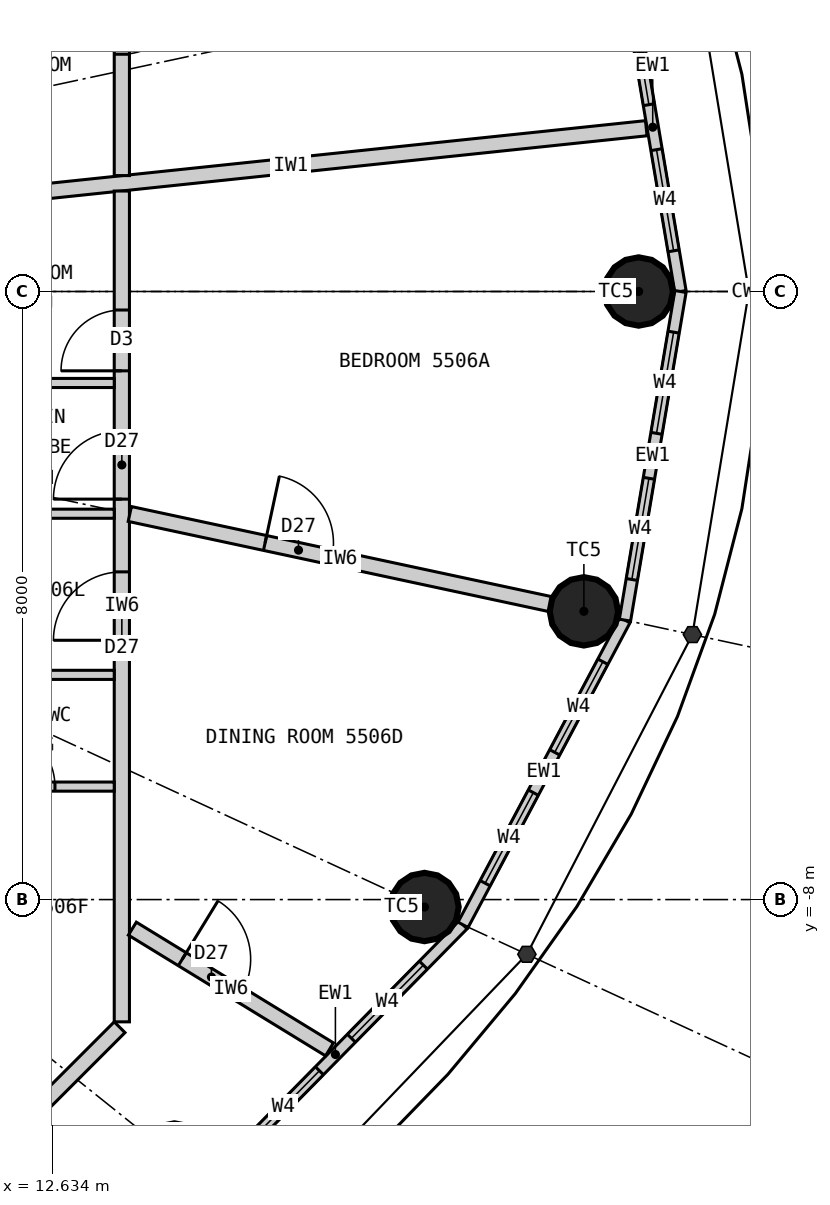
"""IFC4 building model, lengths in metres.
Left out: names, types, materials, properties, quantities, classifications, styles, units other than length and angle.
Written with IfcOpenShell. Run it as: python <this file> out.ifc"""

import sys

from ifc_helpers import new_model, si_unit, direction, frame, frame_2d, origin, origin_2d, place, context, subcontext, project, spatial, rectangle, circle, extrude, element, fill, save


model = new_model("IFC4")
c1 = context("Model", 3, precision=1e-05, world=origin(), true_north=direction((0.0, 1.0)))
c2 = subcontext(c1, "Body", "Model", "MODEL_VIEW")
j1 = project(units=[si_unit("LENGTHUNIT", "METRE"), si_unit("PLANEANGLEUNIT", "RADIAN")], contexts=[c1])
p1 = place(None, origin())
s1 = spatial("IfcSite", under=j1, at=p1, CompositionType="ELEMENT")
p2 = place(p1, origin())
s2 = spatial("IfcBuilding", under=s1, at=p2, CompositionType="ELEMENT")
p3 = place(p2, frame((0.0, 0.0, 206.1)))
s3 = spatial("IfcBuildingStorey", under=s2, at=p3, CompositionType="ELEMENT", Elevation=206.1)
for number, where, z_axis, x_axis in (
    (1, (20.35, 0.0, 0.0), (0.0, 0.0, 1.0), (1.0, 0.0, 0.0)),
    (2, (14.241, -11.393, 0.0), (0.0, 0.0, 1.0), (1.0, 0.0, 0.0)),
    (3, (17.532, -8.098, 0.0), (0.0, 0.0, 1.0), (1.0, 0.0, 0.0)),
    (4, (19.629, -4.208, 0.0), (0.0, 0.0, 1.0), (1.0, 0.0, 0.0)),
):
    element("IfcColumn", number, at=place(p3, frame(where, z_axis=z_axis, x_axis=x_axis)), inside=s3, PredefinedType="COLUMN", context=c2, shape_type="SweptSolid", body=[
        extrude(circle(Radius=0.45, at=origin_2d()), origin(), (0.0, 0.0, 1.0), 3.3),
    ])
p4 = place(p3, frame((20.9, 0.0, 0.0), z_axis=(0.0, 0.0, 1.0), x_axis=(-0.166538513568, 0.986034950445, 0.0)))
e5 = element("IfcWall", 5, at=p4, inside=s3, PredefinedType="ELEMENTEDWALL", context=c2, shape_type="SweptSolid", body=[
    extrude(rectangle(XDim=4.385, YDim=0.15, at=frame_2d((2.192, 0.0))), origin(), (0.0, 0.0, 1.0), 3.12),
])
p5 = place(p4, frame((0.542, 0.0, 0.9)))
e6 = element("IfcOpeningElement", 6, at=p5, cuts=e5, PredefinedType="OPENING", context=c2, shape_type="SweptSolid", body=[
    extrude(rectangle(XDim=1.35, YDim=1.9, at=frame_2d((0.675, 0.95))), frame((0.0, 0.085, 0.0), z_axis=(0.0, -1.0, 0.0), x_axis=(1.0, 0.0, 0.0)), (0.0, 0.0, 1.0), 0.17),
])
p6 = place(p4, frame((2.492, 0.0, 0.9)))
e7 = element("IfcOpeningElement", 7, at=p6, cuts=e5, PredefinedType="OPENING", context=c2, shape_type="SweptSolid", body=[
    extrude(rectangle(XDim=1.35, YDim=1.9, at=frame_2d((0.675, 0.95))), frame((0.0, 0.085, 0.0), z_axis=(0.0, -1.0, 0.0), x_axis=(1.0, 0.0, 0.0)), (0.0, 0.0, 1.0), 0.17),
])
p7 = place(p3, frame((14.68, -11.744, 0.0), z_axis=(0.0, 0.0, 1.0), x_axis=(0.701527379618, 0.712642501993, 0.0)))
e8 = element("IfcWall", 8, at=p7, inside=s3, PredefinedType="ELEMENTEDWALL", context=c2, shape_type="SweptSolid", body=[
    extrude(rectangle(XDim=4.788, YDim=0.15, at=frame_2d((2.394, 0.0))), origin(), (0.0, 0.0, 1.0), 3.12),
])
p8 = place(p7, frame((0.744, 0.0, 0.9)))
e9 = element("IfcOpeningElement", 9, at=p8, cuts=e8, PredefinedType="OPENING", context=c2, shape_type="SweptSolid", body=[
    extrude(rectangle(XDim=1.35, YDim=1.9, at=frame_2d((0.675, 0.95))), frame((0.0, 0.085, 0.0), z_axis=(0.0, -1.0, 0.0), x_axis=(1.0, 0.0, 0.0)), (0.0, 0.0, 1.0), 0.17),
])
p9 = place(p7, frame((2.694, 0.0, 0.9)))
e10 = element("IfcOpeningElement", 10, at=p9, cuts=e8, PredefinedType="OPENING", context=c2, shape_type="SweptSolid", body=[
    extrude(rectangle(XDim=1.35, YDim=1.9, at=frame_2d((0.675, 0.95))), frame((0.0, 0.085, 0.0), z_axis=(0.0, -1.0, 0.0), x_axis=(1.0, 0.0, 0.0)), (0.0, 0.0, 1.0), 0.17),
])
p10 = place(p3, frame((18.04, -8.332, 0.0), z_axis=(0.0, 0.0, 1.0), x_axis=(0.469256152955, 0.883062094597, 0.0)))
e11 = element("IfcWall", 11, at=p10, inside=s3, PredefinedType="ELEMENTEDWALL", context=c2, shape_type="SweptSolid", body=[
    extrude(rectangle(XDim=4.539, YDim=0.15, at=frame_2d((2.27, 0.0))), origin(), (0.0, 0.0, 1.0), 3.12),
])
p11 = place(p10, frame((0.62, 0.0, 0.9)))
e12 = element("IfcOpeningElement", 12, at=p11, cuts=e11, PredefinedType="OPENING", context=c2, shape_type="SweptSolid", body=[
    extrude(rectangle(XDim=1.35, YDim=1.9, at=frame_2d((0.675, 0.95))), frame((0.0, 0.085, 0.0), z_axis=(0.0, -1.0, 0.0), x_axis=(1.0, 0.0, 0.0)), (0.0, 0.0, 1.0), 0.17),
])
p12 = place(p10, frame((2.57, 0.0, 0.9)))
e13 = element("IfcOpeningElement", 13, at=p12, cuts=e11, PredefinedType="OPENING", context=c2, shape_type="SweptSolid", body=[
    extrude(rectangle(XDim=1.35, YDim=1.9, at=frame_2d((0.675, 0.95))), frame((0.0, 0.085, 0.0), z_axis=(0.0, -1.0, 0.0), x_axis=(1.0, 0.0, 0.0)), (0.0, 0.0, 1.0), 0.17),
])
p13 = place(p3, frame((20.17, -4.323, 0.0), z_axis=(0.0, 0.0, 1.0), x_axis=(0.166538513568, 0.986034950445, 0.0)))
e14 = element("IfcWall", 14, at=p13, inside=s3, PredefinedType="ELEMENTEDWALL", context=c2, shape_type="SweptSolid", body=[
    extrude(rectangle(XDim=4.385, YDim=0.15, at=frame_2d((2.192, 0.0))), origin(), (0.0, 0.0, 1.0), 3.12),
])
p14 = place(p13, frame((0.542, 0.0, 0.9)))
e15 = element("IfcOpeningElement", 15, at=p14, cuts=e14, PredefinedType="OPENING", context=c2, shape_type="SweptSolid", body=[
    extrude(rectangle(XDim=1.35, YDim=1.9, at=frame_2d((0.675, 0.95))), frame((0.0, 0.085, 0.0), z_axis=(0.0, -1.0, 0.0), x_axis=(1.0, 0.0, 0.0)), (0.0, 0.0, 1.0), 0.17),
])
p15 = place(p13, frame((2.492, 0.0, 0.9)))
e16 = element("IfcOpeningElement", 16, at=p15, cuts=e14, PredefinedType="OPENING", context=c2, shape_type="SweptSolid", body=[
    extrude(rectangle(XDim=1.35, YDim=1.9, at=frame_2d((0.675, 0.95))), frame((0.0, 0.085, 0.0), z_axis=(0.0, -1.0, 0.0), x_axis=(1.0, 0.0, 0.0)), (0.0, 0.0, 1.0), 0.17),
])
p16 = place(p3, frame((11.1, 1.166, 0.0), z_axis=(0.0, 0.0, 1.0), x_axis=(0.994527487125, 0.104475247564, 0.0)))
e17 = element("IfcWall", 17, at=p16, inside=s3, PredefinedType="PARTITIONING", context=c2, shape_type="SweptSolid", body=[
    extrude(rectangle(XDim=9.401, YDim=0.2, at=frame_2d((4.701, 0.0))), origin(), (0.0, 0.0, 1.0), 2.47),
])
p17 = place(p3, frame((13.55, 1.525, 0.0), z_axis=(0.0, 0.0, 1.0), x_axis=(0.0, 1.0, 0.0)))
e18 = element("IfcWall", 18, at=p17, inside=s3, PredefinedType="PARTITIONING", context=c2, shape_type="SweptSolid", body=[
    extrude(rectangle(XDim=8.084, YDim=0.2, at=frame_2d((4.042, 0.0))), origin(), (0.0, 0.0, 1.0), 3.12),
])
p18 = place(p17, frame((1.597, 0.0, 0.0)))
e19 = element("IfcOpeningElement", 19, at=p18, cuts=e18, PredefinedType="OPENING", context=c2, shape_type="SweptSolid", body=[
    extrude(rectangle(XDim=0.8, YDim=2.1, at=frame_2d((0.4, 1.05))), frame((0.0, 0.11, 0.0), z_axis=(0.0, -1.0, 0.0), x_axis=(1.0, 0.0, 0.0)), (0.0, 0.0, 1.0), 0.22),
])
p19 = place(p17, frame((3.57, 0.0, 0.0)))
e20 = element("IfcOpeningElement", 20, at=p19, cuts=e18, PredefinedType="OPENING", context=c2, shape_type="SweptSolid", body=[
    extrude(rectangle(XDim=0.9, YDim=2.1, at=frame_2d((0.45, 1.05))), frame((0.0, 0.11, 0.0), z_axis=(0.0, -1.0, 0.0), x_axis=(1.0, 0.0, 0.0)), (0.0, 0.0, 1.0), 0.22),
])
p20 = place(p3, frame((10.679, -12.521, 0.0), z_axis=(0.0, 0.0, 1.0), x_axis=(0.707106781187, 0.707106781187, 0.0)))
e21 = element("IfcWall", 21, at=p20, inside=s3, PredefinedType="PARTITIONING", context=c2, shape_type="SweptSolid", body=[
    extrude(rectangle(XDim=4.019, YDim=0.2, at=frame_2d((2.009, 0.0))), origin(), (0.0, 0.0, 1.0), 3.12),
])
p21 = place(p3, frame((13.55, -9.609, 0.0), z_axis=(0.0, 0.0, 1.0), x_axis=(0.0, 1.0, 0.0)))
e22 = element("IfcWall", 22, at=p21, inside=s3, PredefinedType="PARTITIONING", context=c2, shape_type="SweptSolid", body=[
    extrude(rectangle(XDim=10.93, YDim=0.2, at=frame_2d((5.465, 0.0))), origin(), (0.0, 0.0, 1.0), 3.12),
])
p22 = place(p21, frame((5.02, 0.0, 0.0)))
e23 = element("IfcOpeningElement", 23, at=p22, cuts=e22, PredefinedType="OPENING", context=c2, shape_type="SweptSolid", body=[
    extrude(rectangle(XDim=0.9, YDim=2.1, at=frame_2d((0.45, 1.05))), frame((0.0, 0.11, 0.0), z_axis=(0.0, -1.0, 0.0), x_axis=(1.0, 0.0, 0.0)), (0.0, 0.0, 1.0), 0.22),
])
p23 = place(p21, frame((6.877, 0.0, 0.0)))
e24 = element("IfcOpeningElement", 24, at=p23, cuts=e22, PredefinedType="OPENING", context=c2, shape_type="SweptSolid", body=[
    extrude(rectangle(XDim=0.9, YDim=2.1, at=frame_2d((0.45, 1.05))), frame((0.0, 0.11, 0.0), z_axis=(0.0, -1.0, 0.0), x_axis=(1.0, 0.0, 0.0)), (0.0, 0.0, 1.0), 0.22),
])
p24 = place(p21, frame((8.565, 0.0, 0.0)))
e25 = element("IfcOpeningElement", 25, at=p24, cuts=e22, PredefinedType="OPENING", context=c2, shape_type="SweptSolid", body=[
    extrude(rectangle(XDim=0.8, YDim=2.1, at=frame_2d((0.4, 1.05))), frame((0.0, 0.11, 0.0), z_axis=(0.0, -1.0, 0.0), x_axis=(1.0, 0.0, 0.0)), (0.0, 0.0, 1.0), 0.22),
])
p25 = place(p3, frame((13.688, -8.382, 0.0), z_axis=(0.0, 0.0, 1.0), x_axis=(0.852783459586, -0.522264656144, 0.0)))
e26 = element("IfcWall", 26, at=p25, inside=s3, PredefinedType="PARTITIONING", context=c2, shape_type="SweptSolid", body=[
    extrude(rectangle(XDim=3.042, YDim=0.2, at=frame_2d((1.521, 0.0))), origin(), (0.0, 0.0, 1.0), 3.12),
])
p26 = place(p25, frame((0.77, 0.0, 0.0)))
e27 = element("IfcOpeningElement", 27, at=p26, cuts=e26, PredefinedType="OPENING", context=c2, shape_type="SweptSolid", body=[
    extrude(rectangle(XDim=0.9, YDim=2.1, at=frame_2d((0.45, 1.05))), frame((0.0, 0.11, 0.0), z_axis=(0.0, -1.0, 0.0), x_axis=(1.0, 0.0, 0.0)), (0.0, 0.0, 1.0), 0.22),
])
p27 = place(p3, frame((13.655, -2.927, 0.0), z_axis=(0.0, 0.0, 1.0), x_axis=(0.977790419294, -0.209585056568, 0.0)))
e28 = element("IfcWall", 28, at=p27, inside=s3, PredefinedType="PARTITIONING", context=c2, shape_type="SweptSolid", body=[
    extrude(rectangle(XDim=5.66, YDim=0.2, at=frame_2d((2.83, 0.0))), origin(), (0.0, 0.0, 1.0), 2.42),
])
p28 = place(p27, frame((1.82, 0.0, 0.0)))
e29 = element("IfcOpeningElement", 29, at=p28, cuts=e28, PredefinedType="OPENING", context=c2, shape_type="SweptSolid", body=[
    extrude(rectangle(XDim=0.9, YDim=2.1, at=frame_2d((0.45, 1.05))), frame((0.0, 0.11, 0.0), z_axis=(0.0, -1.0, 0.0), x_axis=(1.0, 0.0, 0.0)), (0.0, 0.0, 1.0), 0.22),
])
p29 = place(p3, frame((11.1, -6.514, 0.0), z_axis=(0.0, 0.0, 1.0), x_axis=(1.0, 0.0, 0.0)))
e30 = element("IfcWall", 30, at=p29, inside=s3, PredefinedType="PARTITIONING", context=c2, shape_type="SweptSolid", body=[
    extrude(rectangle(XDim=2.35, YDim=0.12, at=frame_2d((1.175, 0.0))), origin(), (0.0, 0.0, 1.0), 3.12),
])
p30 = place(p29, frame((0.77, 0.0, 0.0)))
e31 = element("IfcOpeningElement", 31, at=p30, cuts=e30, PredefinedType="OPENING", context=c2, shape_type="SweptSolid", body=[
    extrude(rectangle(XDim=0.8, YDim=2.1, at=frame_2d((0.4, 1.05))), frame((0.0, 0.07, 0.0), z_axis=(0.0, -1.0, 0.0), x_axis=(1.0, 0.0, 0.0)), (0.0, 0.0, 1.0), 0.14),
])
p31 = place(p3, frame((11.1, -5.044, 0.0), z_axis=(0.0, 0.0, 1.0), x_axis=(1.0, 0.0, 0.0)))
e32 = element("IfcWall", 32, at=p31, inside=s3, PredefinedType="PARTITIONING", context=c2, shape_type="SweptSolid", body=[
    extrude(rectangle(XDim=2.35, YDim=0.12, at=frame_2d((1.175, 0.0))), origin(), (0.0, 0.0, 1.0), 3.12),
])
p32 = place(p3, frame((11.1, -2.924, 0.0), z_axis=(0.0, 0.0, 1.0), x_axis=(1.0, 0.0, 0.0)))
e33 = element("IfcWall", 33, at=p32, inside=s3, PredefinedType="PARTITIONING", context=c2, shape_type="SweptSolid", body=[
    extrude(rectangle(XDim=2.35, YDim=0.12, at=frame_2d((1.175, 0.0))), origin(), (0.0, 0.0, 1.0), 2.42),
])
p33 = place(p3, frame((11.1, -1.204, 0.0), z_axis=(0.0, 0.0, 1.0), x_axis=(1.0, 0.0, 0.0)))
e34 = element("IfcWall", 34, at=p33, inside=s3, PredefinedType="PARTITIONING", context=c2, shape_type="SweptSolid", body=[
    extrude(rectangle(XDim=2.35, YDim=0.12, at=frame_2d((1.175, 0.0))), origin(), (0.0, 0.0, 1.0), 3.12),
])
p34 = place(p5, origin())
e35 = element("IfcWindow", 35, at=p34, inside=s3, PartitioningType="SINGLE_PANEL", PredefinedType="WINDOW", context=c2, shape_type="SweptSolid", body=[
    extrude(rectangle(XDim=1.35, YDim=1.9, at=frame_2d((0.675, 0.95))), frame((0.0, 0.03, 0.0), z_axis=(0.0, -1.0, 0.0), x_axis=(1.0, 0.0, 0.0)), (0.0, 0.0, 1.0), 0.06),
])
fill(e6, e35)
p35 = place(p6, origin())
e36 = element("IfcWindow", 36, at=p35, inside=s3, PartitioningType="SINGLE_PANEL", PredefinedType="WINDOW", context=c2, shape_type="SweptSolid", body=[
    extrude(rectangle(XDim=1.35, YDim=1.9, at=frame_2d((0.675, 0.95))), frame((0.0, 0.03, 0.0), z_axis=(0.0, -1.0, 0.0), x_axis=(1.0, 0.0, 0.0)), (0.0, 0.0, 1.0), 0.06),
])
fill(e7, e36)
p36 = place(p8, origin())
e37 = element("IfcWindow", 37, at=p36, inside=s3, PartitioningType="SINGLE_PANEL", PredefinedType="WINDOW", context=c2, shape_type="SweptSolid", body=[
    extrude(rectangle(XDim=1.35, YDim=1.9, at=frame_2d((0.675, 0.95))), frame((0.0, 0.03, 0.0), z_axis=(0.0, -1.0, 0.0), x_axis=(1.0, 0.0, 0.0)), (0.0, 0.0, 1.0), 0.06),
])
fill(e9, e37)
p37 = place(p9, origin())
e38 = element("IfcWindow", 38, at=p37, inside=s3, PartitioningType="SINGLE_PANEL", PredefinedType="WINDOW", context=c2, shape_type="SweptSolid", body=[
    extrude(rectangle(XDim=1.35, YDim=1.9, at=frame_2d((0.675, 0.95))), frame((0.0, 0.03, 0.0), z_axis=(0.0, -1.0, 0.0), x_axis=(1.0, 0.0, 0.0)), (0.0, 0.0, 1.0), 0.06),
])
fill(e10, e38)
p38 = place(p11, origin())
e39 = element("IfcWindow", 39, at=p38, inside=s3, PartitioningType="SINGLE_PANEL", PredefinedType="WINDOW", context=c2, shape_type="SweptSolid", body=[
    extrude(rectangle(XDim=1.35, YDim=1.9, at=frame_2d((0.675, 0.95))), frame((0.0, 0.03, 0.0), z_axis=(0.0, -1.0, 0.0), x_axis=(1.0, 0.0, 0.0)), (0.0, 0.0, 1.0), 0.06),
])
fill(e12, e39)
p39 = place(p12, origin())
e40 = element("IfcWindow", 40, at=p39, inside=s3, PartitioningType="SINGLE_PANEL", PredefinedType="WINDOW", context=c2, shape_type="SweptSolid", body=[
    extrude(rectangle(XDim=1.35, YDim=1.9, at=frame_2d((0.675, 0.95))), frame((0.0, 0.03, 0.0), z_axis=(0.0, -1.0, 0.0), x_axis=(1.0, 0.0, 0.0)), (0.0, 0.0, 1.0), 0.06),
])
fill(e13, e40)
p40 = place(p14, origin())
e41 = element("IfcWindow", 41, at=p40, inside=s3, PartitioningType="SINGLE_PANEL", PredefinedType="WINDOW", context=c2, shape_type="SweptSolid", body=[
    extrude(rectangle(XDim=1.35, YDim=1.9, at=frame_2d((0.675, 0.95))), frame((0.0, 0.03, 0.0), z_axis=(0.0, -1.0, 0.0), x_axis=(1.0, 0.0, 0.0)), (0.0, 0.0, 1.0), 0.06),
])
fill(e15, e41)
p41 = place(p15, origin())
e42 = element("IfcWindow", 42, at=p41, inside=s3, PartitioningType="SINGLE_PANEL", PredefinedType="WINDOW", context=c2, shape_type="SweptSolid", body=[
    extrude(rectangle(XDim=1.35, YDim=1.9, at=frame_2d((0.675, 0.95))), frame((0.0, 0.03, 0.0), z_axis=(0.0, -1.0, 0.0), x_axis=(1.0, 0.0, 0.0)), (0.0, 0.0, 1.0), 0.06),
])
fill(e16, e42)
p42 = place(p18, origin())
e43 = element("IfcDoor", 43, at=p42, inside=s3, OperationType="SINGLE_SWING_RIGHT", PredefinedType="DOOR", context=c2, shape_type="SweptSolid", body=[
    extrude(rectangle(XDim=0.8, YDim=2.1, at=frame_2d((0.4, 1.05))), frame((0.0, 0.025, 0.0), z_axis=(0.0, -1.0, 0.0), x_axis=(1.0, 0.0, 0.0)), (0.0, 0.0, 1.0), 0.05),
])
fill(e19, e43)
p43 = place(p30, origin())
e44 = element("IfcDoor", 44, at=p43, inside=s3, OperationType="SINGLE_SWING_LEFT", PredefinedType="DOOR", context=c2, shape_type="SweptSolid", body=[
    extrude(rectangle(XDim=0.8, YDim=2.1, at=frame_2d((0.4, 1.05))), frame((0.0, 0.025, 0.0), z_axis=(0.0, -1.0, 0.0), x_axis=(1.0, 0.0, 0.0)), (0.0, 0.0, 1.0), 0.05),
])
fill(e31, e44)
p44 = place(p22, origin())
e45 = element("IfcDoor", 45, at=p44, inside=s3, OperationType="SINGLE_SWING_LEFT", PredefinedType="DOOR", context=c2, shape_type="SweptSolid", body=[
    extrude(rectangle(XDim=0.9, YDim=2.1, at=frame_2d((0.45, 1.05))), frame((0.0, 0.025, 0.0), z_axis=(0.0, -1.0, 0.0), x_axis=(1.0, 0.0, 0.0)), (0.0, 0.0, 1.0), 0.05),
])
fill(e23, e45)
p45 = place(p23, origin())
e46 = element("IfcDoor", 46, at=p45, inside=s3, OperationType="SINGLE_SWING_LEFT", PredefinedType="DOOR", context=c2, shape_type="SweptSolid", body=[
    extrude(rectangle(XDim=0.9, YDim=2.1, at=frame_2d((0.45, 1.05))), frame((0.0, 0.025, 0.0), z_axis=(0.0, -1.0, 0.0), x_axis=(1.0, 0.0, 0.0)), (0.0, 0.0, 1.0), 0.05),
])
fill(e24, e46)
p46 = place(p24, origin())
e47 = element("IfcDoor", 47, at=p46, inside=s3, OperationType="SINGLE_SWING_LEFT", PredefinedType="DOOR", context=c2, shape_type="SweptSolid", body=[
    extrude(rectangle(XDim=0.8, YDim=2.1, at=frame_2d((0.4, 1.05))), frame((0.0, 0.025, 0.0), z_axis=(0.0, -1.0, 0.0), x_axis=(1.0, 0.0, 0.0)), (0.0, 0.0, 1.0), 0.05),
])
fill(e25, e47)
p47 = place(p26, origin())
e48 = element("IfcDoor", 48, at=p47, inside=s3, OperationType="SINGLE_SWING_LEFT", PredefinedType="DOOR", context=c2, shape_type="SweptSolid", body=[
    extrude(rectangle(XDim=0.9, YDim=2.1, at=frame_2d((0.45, 1.05))), frame((0.0, 0.025, 0.0), z_axis=(0.0, -1.0, 0.0), x_axis=(1.0, 0.0, 0.0)), (0.0, 0.0, 1.0), 0.05),
])
fill(e27, e48)
p48 = place(p28, origin())
e49 = element("IfcDoor", 49, at=p48, inside=s3, OperationType="SINGLE_SWING_LEFT", PredefinedType="DOOR", context=c2, shape_type="SweptSolid", body=[
    extrude(rectangle(XDim=0.9, YDim=2.1, at=frame_2d((0.45, 1.05))), frame((0.0, 0.025, 0.0), z_axis=(0.0, -1.0, 0.0), x_axis=(1.0, 0.0, 0.0)), (0.0, 0.0, 1.0), 0.05),
])
fill(e29, e49)
save(model, sys.argv[1])
